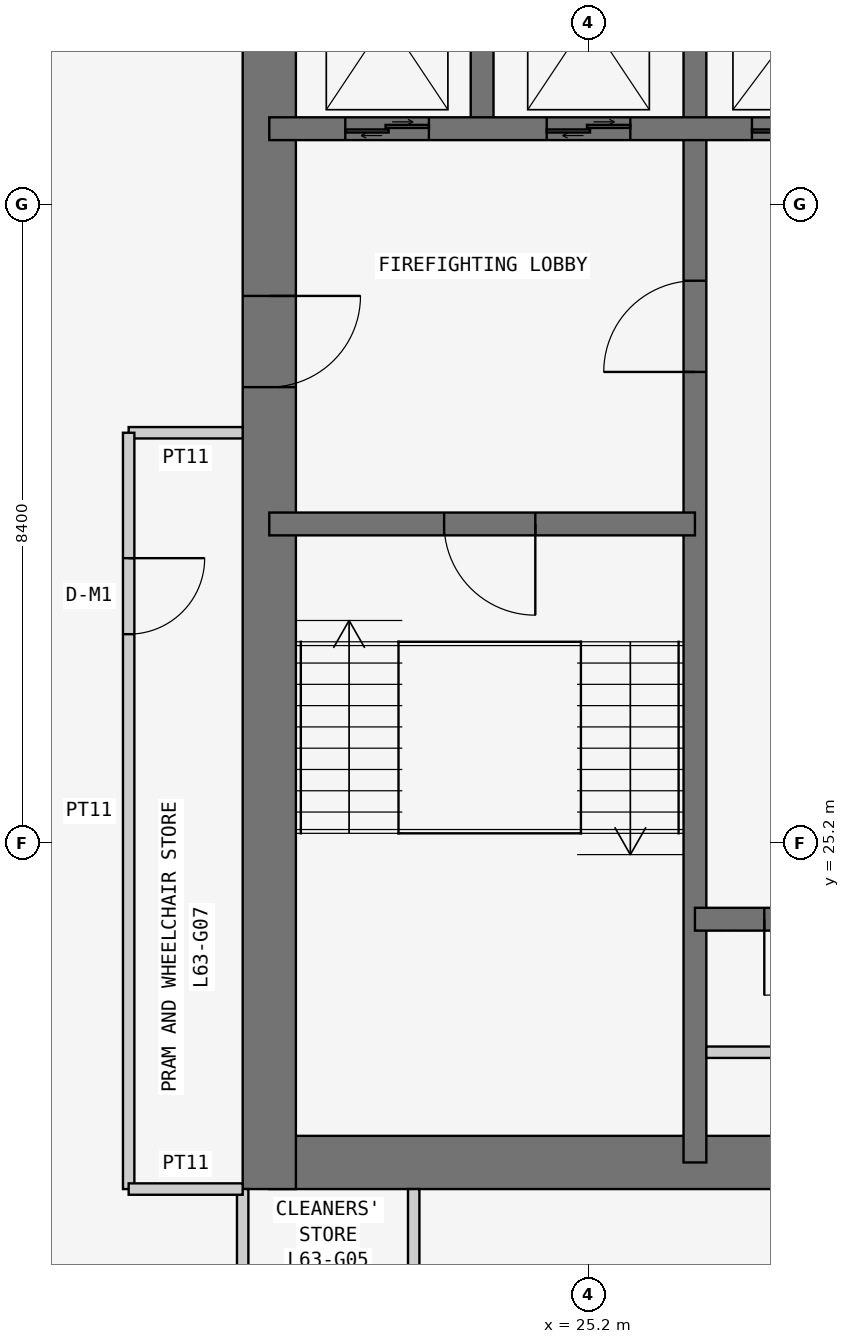
"""IFC4 building model, lengths in metres.
Left out: names, types, materials, properties, quantities, classifications, styles, units other than length and angle.
Written with IfcOpenShell. Run it as: python <this file> out.ifc"""

import sys

from ifc_helpers import new_model, si_unit, direction, frame, frame_2d, origin, place, context, subcontext, project, spatial, rectangle, extrude, element, fill, save


model = new_model("IFC4")
c1 = context("Model", 3, precision=1e-05, world=origin(), true_north=direction((0.0, 1.0)))
c2 = subcontext(c1, "Body", "Model", "MODEL_VIEW")
j1 = project(units=[si_unit("LENGTHUNIT", "METRE"), si_unit("PLANEANGLEUNIT", "RADIAN")], contexts=[c1])
p1 = place(None, origin())
s1 = spatial("IfcSite", under=j1, at=p1, CompositionType="ELEMENT")
p2 = place(p1, origin())
s2 = spatial("IfcBuilding", under=s1, at=p2, CompositionType="ELEMENT")
p3 = place(p2, frame((0.0, 0.0, 240.9)))
s3 = spatial("IfcBuildingStorey", under=s2, at=p3, CompositionType="ELEMENT", Elevation=240.9)
p4 = place(p3, frame((21.0, 21.0, 0.0), z_axis=(0.0, 0.0, 1.0), x_axis=(1.0, 0.0, 0.0)))
e1 = element("IfcWall", 1, at=p4, inside=s3, PredefinedType="SHEAR", context=c2, shape_type="SweptSolid", body=[
    extrude(rectangle(XDim=17.15, YDim=0.7, at=frame_2d((8.575, 0.0))), origin(), (0.0, 0.0, 1.0), 3.6),
])
p5 = place(p3, frame((21.0, 37.8, 0.0), z_axis=(0.0, 0.0, 1.0), x_axis=(0.0, -1.0, 0.0)))
e2 = element("IfcWall", 2, at=p5, inside=s3, PredefinedType="SHEAR", context=c2, shape_type="SweptSolid", body=[
    extrude(rectangle(XDim=17.15, YDim=0.7, at=frame_2d((8.575, 0.0))), origin(), (0.0, 0.0, 1.0), 3.6),
])
p6 = place(p5, frame((5.4, 0.0, 0.0)))
e3 = element("IfcOpeningElement", 3, at=p6, cuts=e2, PredefinedType="OPENING", context=c2, shape_type="SweptSolid", body=[
    extrude(rectangle(XDim=1.2, YDim=2.1, at=frame_2d((0.6, 1.05))), frame((0.0, 0.36, 0.0), z_axis=(0.0, -1.0, 0.0), x_axis=(1.0, 0.0, 0.0)), (0.0, 0.0, 1.0), 0.72),
])
p7 = place(p3, frame((26.6, 21.0, 0.0), z_axis=(0.0, 0.0, 1.0), x_axis=(0.0, 1.0, 0.0)))
e4 = element("IfcWall", 4, at=p7, inside=s3, PredefinedType="SHEAR", context=c2, shape_type="SweptSolid", body=[
    extrude(rectangle(XDim=16.8, YDim=0.3, at=frame_2d((8.4, 0.0))), origin(), (0.0, 0.0, 1.0), 3.6),
])
p8 = place(p7, frame((10.4, 0.0, 0.0)))
e5 = element("IfcOpeningElement", 5, at=p8, cuts=e4, PredefinedType="OPENING", context=c2, shape_type="SweptSolid", body=[
    extrude(rectangle(XDim=1.2, YDim=2.1, at=frame_2d((0.6, 1.05))), frame((0.0, 0.16, 0.0), z_axis=(0.0, -1.0, 0.0), x_axis=(1.0, 0.0, 0.0)), (0.0, 0.0, 1.0), 0.32),
])
p9 = place(p3, frame((21.0, 29.4, 0.0), z_axis=(0.0, 0.0, 1.0), x_axis=(1.0, 0.0, 0.0)))
e6 = element("IfcWall", 6, at=p9, inside=s3, PredefinedType="SHEAR", context=c2, shape_type="SweptSolid", body=[
    extrude(rectangle(XDim=5.6, YDim=0.3, at=frame_2d((2.8, 0.0))), origin(), (0.0, 0.0, 1.0), 3.6),
])
p10 = place(p9, frame((2.3, 0.0, 0.0)))
e7 = element("IfcOpeningElement", 7, at=p10, cuts=e6, PredefinedType="OPENING", context=c2, shape_type="SweptSolid", body=[
    extrude(rectangle(XDim=1.2, YDim=2.1, at=frame_2d((0.6, 1.05))), frame((0.0, 0.16, 0.0), z_axis=(0.0, -1.0, 0.0), x_axis=(1.0, 0.0, 0.0)), (0.0, 0.0, 1.0), 0.32),
])
p11 = place(p3, frame((21.0, 34.6, 0.0), z_axis=(0.0, 0.0, 1.0), x_axis=(1.0, 0.0, 0.0)))
e8 = element("IfcWall", 8, at=p11, inside=s3, PredefinedType="SHEAR", context=c2, shape_type="SweptSolid", body=[
    extrude(rectangle(XDim=11.2, YDim=0.3, at=frame_2d((5.6, 0.0))), origin(), (0.0, 0.0, 1.0), 3.6),
])
p12 = place(p11, frame((9.25, 0.0, 0.0)))
e9 = element("IfcOpeningElement", 9, at=p12, cuts=e8, PredefinedType="OPENING", context=c2, shape_type="SweptSolid", body=[
    extrude(rectangle(XDim=1.1, YDim=2.1, at=frame_2d((0.55, 1.05))), frame((0.0, 0.16, 0.0), z_axis=(0.0, -1.0, 0.0), x_axis=(1.0, 0.0, 0.0)), (0.0, 0.0, 1.0), 0.32),
])
p13 = place(p11, frame((1.0, 0.0, 0.0)))
e10 = element("IfcOpeningElement", 10, at=p13, cuts=e8, PredefinedType="OPENING", context=c2, shape_type="SweptSolid", body=[
    extrude(rectangle(XDim=1.1, YDim=2.1, at=frame_2d((0.55, 1.05))), frame((0.0, 0.16, 0.0), z_axis=(0.0, -1.0, 0.0), x_axis=(1.0, 0.0, 0.0)), (0.0, 0.0, 1.0), 0.32),
])
p14 = place(p11, frame((3.65, 0.0, 0.0)))
e11 = element("IfcOpeningElement", 11, at=p14, cuts=e8, PredefinedType="OPENING", context=c2, shape_type="SweptSolid", body=[
    extrude(rectangle(XDim=1.1, YDim=2.1, at=frame_2d((0.55, 1.05))), frame((0.0, 0.16, 0.0), z_axis=(0.0, -1.0, 0.0), x_axis=(1.0, 0.0, 0.0)), (0.0, 0.0, 1.0), 0.32),
])
p15 = place(p11, frame((6.35, 0.0, 0.0)))
e12 = element("IfcOpeningElement", 12, at=p15, cuts=e8, PredefinedType="OPENING", context=c2, shape_type="SweptSolid", body=[
    extrude(rectangle(XDim=1.3, YDim=2.1, at=frame_2d((0.65, 1.05))), frame((0.0, 0.16, 0.0), z_axis=(0.0, -1.0, 0.0), x_axis=(1.0, 0.0, 0.0)), (0.0, 0.0, 1.0), 0.32),
])
p16 = place(p3, frame((23.8, 34.6, 0.0), z_axis=(0.0, 0.0, 1.0), x_axis=(0.0, 1.0, 0.0)))
e13 = element("IfcWall", 13, at=p16, inside=s3, PredefinedType="SHEAR", context=c2, shape_type="SweptSolid", body=[
    extrude(rectangle(XDim=3.2, YDim=0.3, at=frame_2d((1.6, 0.0))), origin(), (0.0, 0.0, 1.0), 3.6),
])
p17 = place(p3, frame((26.6, 24.2, 0.0), z_axis=(0.0, 0.0, 1.0), x_axis=(1.0, 0.0, 0.0)))
e14 = element("IfcWall", 14, at=p17, inside=s3, PredefinedType="SHEAR", context=c2, shape_type="SweptSolid", body=[
    extrude(rectangle(XDim=11.2, YDim=0.3, at=frame_2d((5.6, 0.0))), origin(), (0.0, 0.0, 1.0), 3.6),
])
p18 = place(p17, frame((0.913, 0.0, 0.0)))
e15 = element("IfcOpeningElement", 15, at=p18, cuts=e14, PredefinedType="OPENING", context=c2, shape_type="SweptSolid", body=[
    extrude(rectangle(XDim=1.0, YDim=2.1, at=frame_2d((0.5, 1.05))), frame((0.0, 0.16, 0.0), z_axis=(0.0, -1.0, 0.0), x_axis=(1.0, 0.0, 0.0)), (0.0, 0.0, 1.0), 0.32),
])
p19 = place(p17, frame((3.75, 0.0, 0.0)))
e16 = element("IfcOpeningElement", 16, at=p19, cuts=e14, PredefinedType="OPENING", context=c2, shape_type="SweptSolid", body=[
    extrude(rectangle(XDim=0.9, YDim=2.1, at=frame_2d((0.45, 1.05))), frame((0.0, 0.16, 0.0), z_axis=(0.0, -1.0, 0.0), x_axis=(1.0, 0.0, 0.0)), (0.0, 0.0, 1.0), 0.32),
])
p20 = place(p17, frame((6.45, 0.0, 0.0)))
e17 = element("IfcOpeningElement", 17, at=p20, cuts=e14, PredefinedType="OPENING", context=c2, shape_type="SweptSolid", body=[
    extrude(rectangle(XDim=1.1, YDim=2.1, at=frame_2d((0.55, 1.05))), frame((0.0, 0.16, 0.0), z_axis=(0.0, -1.0, 0.0), x_axis=(1.0, 0.0, 0.0)), (0.0, 0.0, 1.0), 0.32),
])
p21 = place(p17, frame((9.1, 0.0, 0.0)))
e18 = element("IfcOpeningElement", 18, at=p21, cuts=e14, PredefinedType="OPENING", context=c2, shape_type="SweptSolid", body=[
    extrude(rectangle(XDim=1.1, YDim=2.1, at=frame_2d((0.55, 1.05))), frame((0.0, 0.16, 0.0), z_axis=(0.0, -1.0, 0.0), x_axis=(1.0, 0.0, 0.0)), (0.0, 0.0, 1.0), 0.32),
])
for number, where, z_axis, x_axis in (
    (19, (20.65, 20.65, 0.0), (0.0, 0.0, 1.0), (0.0, -1.0, 0.0)),
    (20, (22.9, 18.2, 0.0), (0.0, 0.0, 1.0), (0.0, 1.0, 0.0)),
):
    element("IfcWall", number, at=place(p3, frame(where, z_axis=z_axis, x_axis=x_axis)), inside=s3, PredefinedType="PARTITIONING", context=c2, shape_type="SweptSolid", body=[
        extrude(rectangle(XDim=2.45, YDim=0.15, at=frame_2d((1.225, 0.0))), origin(), (0.0, 0.0, 1.0), 3.45),
    ])
p22 = place(p3, frame((20.65, 30.6, 0.0), z_axis=(0.0, 0.0, 1.0), x_axis=(-1.0, 0.0, 0.0)))
e21 = element("IfcWall", 21, at=p22, inside=s3, PredefinedType="PARTITIONING", context=c2, shape_type="SweptSolid", body=[
    extrude(rectangle(XDim=1.5, YDim=0.15, at=frame_2d((0.75, 0.0))), origin(), (0.0, 0.0, 1.0), 3.45),
])
p23 = place(p3, frame((19.15, 30.6, 0.0), z_axis=(0.0, 0.0, 1.0), x_axis=(0.0, -1.0, 0.0)))
e22 = element("IfcWall", 22, at=p23, inside=s3, PredefinedType="PARTITIONING", context=c2, shape_type="SweptSolid", body=[
    extrude(rectangle(XDim=9.95, YDim=0.15, at=frame_2d((4.975, 0.0))), origin(), (0.0, 0.0, 1.0), 3.45),
])
p24 = place(p23, frame((1.65, 0.0, 0.0)))
e23 = element("IfcOpeningElement", 23, at=p24, cuts=e22, PredefinedType="OPENING", context=c2, shape_type="SweptSolid", body=[
    extrude(rectangle(XDim=1.0, YDim=2.1, at=frame_2d((0.5, 1.05))), frame((0.0, 0.085, 0.0), z_axis=(0.0, -1.0, 0.0), x_axis=(1.0, 0.0, 0.0)), (0.0, 0.0, 1.0), 0.17),
])
p25 = place(p3, frame((19.15, 20.65, 0.0), z_axis=(0.0, 0.0, 1.0), x_axis=(1.0, 0.0, 0.0)))
e24 = element("IfcWall", 24, at=p25, inside=s3, PredefinedType="PARTITIONING", context=c2, shape_type="SweptSolid", body=[
    extrude(rectangle(XDim=1.5, YDim=0.15, at=frame_2d((0.75, 0.0))), origin(), (0.0, 0.0, 1.0), 3.45),
])
p26 = place(p3, frame((26.75, 22.45, 0.0), z_axis=(0.0, 0.0, 1.0), x_axis=(1.0, 0.0, 0.0)))
e25 = element("IfcWall", 25, at=p26, inside=s3, PredefinedType="PARTITIONING", context=c2, shape_type="SweptSolid", body=[
    extrude(rectangle(XDim=2.525, YDim=0.15, at=frame_2d((1.262, 0.0))), origin(), (0.0, 0.0, 1.0), 3.45),
])
p27 = place(p26, frame((0.863, 0.0, 0.0)))
e26 = element("IfcOpeningElement", 26, at=p27, cuts=e25, PredefinedType="OPENING", context=c2, shape_type="SweptSolid", body=[
    extrude(rectangle(XDim=0.8, YDim=2.1, at=frame_2d((0.4, 1.05))), frame((0.0, 0.085, 0.0), z_axis=(0.0, -1.0, 0.0), x_axis=(1.0, 0.0, 0.0)), (0.0, 0.0, 1.0), 0.17),
])
p28 = place(p24, origin())
e27 = element("IfcDoor", 27, at=p28, inside=s3, OperationType="SINGLE_SWING_LEFT", PredefinedType="DOOR", context=c2, shape_type="SweptSolid", body=[
    extrude(rectangle(XDim=1.0, YDim=2.1, at=frame_2d((0.5, 1.05))), frame((0.0, 0.025, 0.0), z_axis=(0.0, -1.0, 0.0), x_axis=(1.0, 0.0, 0.0)), (0.0, 0.0, 1.0), 0.05),
])
fill(e23, e27)
p29 = place(p6, origin())
e28 = element("IfcDoor", 28, at=p29, inside=s3, OperationType="SINGLE_SWING_LEFT", PredefinedType="DOOR", context=c2, shape_type="SweptSolid", body=[
    extrude(rectangle(XDim=1.2, YDim=2.1, at=frame_2d((0.6, 1.05))), frame((0.0, 0.025, 0.0), z_axis=(0.0, -1.0, 0.0), x_axis=(1.0, 0.0, 0.0)), (0.0, 0.0, 1.0), 0.05),
])
fill(e3, e28)
p30 = place(p10, frame((1.2, 0.0, 0.0), z_axis=(0.0, 0.0, 1.0), x_axis=(-1.0, 0.0, 0.0)))
e29 = element("IfcDoor", 29, at=p30, inside=s3, OperationType="SINGLE_SWING_LEFT", PredefinedType="DOOR", context=c2, shape_type="SweptSolid", body=[
    extrude(rectangle(XDim=1.2, YDim=2.1, at=frame_2d((0.6, 1.05))), frame((0.0, 0.025, 0.0), z_axis=(0.0, -1.0, 0.0), x_axis=(1.0, 0.0, 0.0)), (0.0, 0.0, 1.0), 0.05),
])
fill(e7, e29)
p31 = place(p8, origin())
e30 = element("IfcDoor", 30, at=p31, inside=s3, OperationType="SINGLE_SWING_LEFT", PredefinedType="DOOR", context=c2, shape_type="SweptSolid", body=[
    extrude(rectangle(XDim=1.2, YDim=2.1, at=frame_2d((0.6, 1.05))), frame((0.0, 0.025, 0.0), z_axis=(0.0, -1.0, 0.0), x_axis=(1.0, 0.0, 0.0)), (0.0, 0.0, 1.0), 0.05),
])
fill(e5, e30)
p32 = place(p18, frame((1.0, 0.0, 0.0), z_axis=(0.0, 0.0, 1.0), x_axis=(-1.0, 0.0, 0.0)))
e31 = element("IfcDoor", 31, at=p32, inside=s3, OperationType="SINGLE_SWING_RIGHT", PredefinedType="DOOR", context=c2, shape_type="SweptSolid", body=[
    extrude(rectangle(XDim=1.0, YDim=2.1, at=frame_2d((0.5, 1.05))), frame((0.0, 0.025, 0.0), z_axis=(0.0, -1.0, 0.0), x_axis=(1.0, 0.0, 0.0)), (0.0, 0.0, 1.0), 0.05),
])
fill(e15, e31)
p33 = place(p13, origin())
e32 = element("IfcDoor", 32, at=p33, inside=s3, OperationType="DOUBLE_DOOR_SLIDING", PredefinedType="DOOR", context=c2, shape_type="SweptSolid", body=[
    extrude(rectangle(XDim=1.1, YDim=2.1, at=frame_2d((0.55, 1.05))), frame((0.0, 0.025, 0.0), z_axis=(0.0, -1.0, 0.0), x_axis=(1.0, 0.0, 0.0)), (0.0, 0.0, 1.0), 0.05),
])
fill(e10, e32)
p34 = place(p14, origin())
e33 = element("IfcDoor", 33, at=p34, inside=s3, OperationType="DOUBLE_DOOR_SLIDING", PredefinedType="DOOR", context=c2, shape_type="SweptSolid", body=[
    extrude(rectangle(XDim=1.1, YDim=2.1, at=frame_2d((0.55, 1.05))), frame((0.0, 0.025, 0.0), z_axis=(0.0, -1.0, 0.0), x_axis=(1.0, 0.0, 0.0)), (0.0, 0.0, 1.0), 0.05),
])
fill(e11, e33)
p35 = place(p15, origin())
e34 = element("IfcDoor", 34, at=p35, inside=s3, OperationType="DOUBLE_DOOR_SLIDING", PredefinedType="DOOR", context=c2, shape_type="SweptSolid", body=[
    extrude(rectangle(XDim=1.3, YDim=2.1, at=frame_2d((0.65, 1.05))), frame((0.0, 0.025, 0.0), z_axis=(0.0, -1.0, 0.0), x_axis=(1.0, 0.0, 0.0)), (0.0, 0.0, 1.0), 0.05),
])
fill(e12, e34)
save(model, sys.argv[1])
